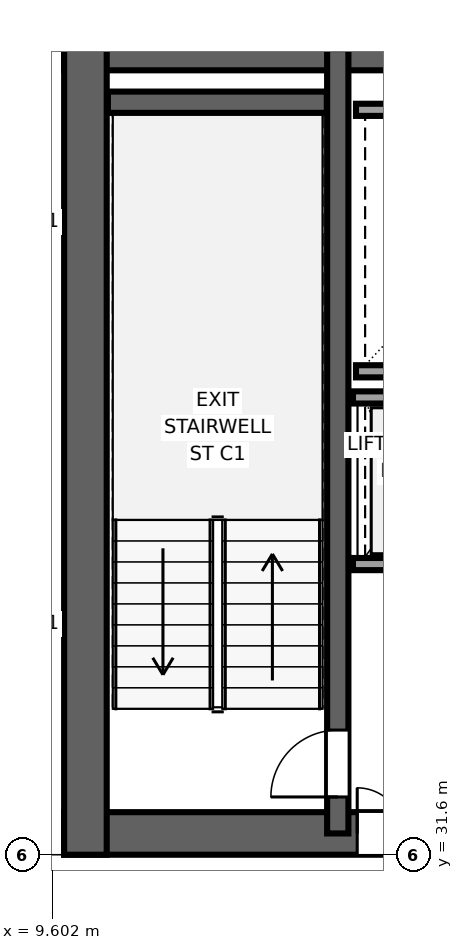
"""IFC4 building model, lengths in metres.
Left out: names, types, materials, properties, quantities, classifications, styles, units other than length and angle.
Written with IfcOpenShell. Run it as: python <this file> out.ifc"""

import sys

from ifc_helpers import new_model, si_unit, direction, frame, frame_2d, origin, place, context, subcontext, project, spatial, rectangle, extrude, source, transform, mapped, element, fill, save


model = new_model("IFC4")
c1 = context("Model", 3, precision=1e-05, world=origin(), true_north=direction((0.0, 1.0)))
c2 = subcontext(c1, "Body", "Model", "MODEL_VIEW")
j1 = project(units=[si_unit("LENGTHUNIT", "METRE"), si_unit("PLANEANGLEUNIT", "RADIAN")], contexts=[c1])
p1 = place(None, origin())
s1 = spatial("IfcSite", under=j1, at=p1, CompositionType="ELEMENT")
p2 = place(p1, origin())
s2 = spatial("IfcBuilding", under=s1, at=p2, CompositionType="ELEMENT")
p3 = place(p2, frame((0.0, 0.0, 122.2)))
s3 = spatial("IfcBuildingStorey", under=s2, at=p3, CompositionType="ELEMENT", Elevation=122.2)
p4 = place(p3, frame((9.8, 31.95, 0.0), z_axis=(0.0, 0.0, 1.0), x_axis=(1.0, 0.0, 0.0)))
e1 = element("IfcWall", 1, at=p4, inside=s3, PredefinedType="SHEAR", context=c2, shape_type="SweptSolid", body=[
    extrude(rectangle(XDim=26.4, YDim=0.7, at=frame_2d((13.2, 0.0))), origin(), (0.0, 0.0, 1.0), 3.55),
])
p5 = place(p4, frame((6.32, 0.0, 0.0), z_axis=(0.0, 0.0, 1.0), x_axis=(-1.0, 0.0, 0.0)))
e2 = element("IfcOpeningElement", 2, at=p5, cuts=e1, PredefinedType="OPENING", context=c2, shape_type="SweptSolid", body=[
    extrude(rectangle(XDim=1.5, YDim=2.04, at=frame_2d((0.75, 1.02))), frame((0.0, 0.36, 0.0), z_axis=(0.0, -1.0, 0.0), x_axis=(1.0, 0.0, 0.0)), (0.0, 0.0, 1.0), 0.72),
])
p6 = place(p4, frame((13.95, 0.0, 0.0), z_axis=(0.0, 0.0, 1.0), x_axis=(-1.0, 0.0, 0.0)))
e3 = element("IfcOpeningElement", 3, at=p6, cuts=e1, PredefinedType="OPENING", context=c2, shape_type="SweptSolid", body=[
    extrude(rectangle(XDim=1.5, YDim=2.04, at=frame_2d((0.75, 1.02))), frame((0.0, 0.36, 0.0), z_axis=(0.0, -1.0, 0.0), x_axis=(1.0, 0.0, 0.0)), (0.0, 0.0, 1.0), 0.72),
])
p7 = place(p4, frame((20.25, 0.0, 0.0), z_axis=(0.0, 0.0, 1.0), x_axis=(-1.0, 0.0, 0.0)))
e4 = element("IfcOpeningElement", 4, at=p7, cuts=e1, PredefinedType="OPENING", context=c2, shape_type="SweptSolid", body=[
    extrude(rectangle(XDim=1.5, YDim=2.04, at=frame_2d((0.75, 1.02))), frame((0.0, 0.36, 0.0), z_axis=(0.0, -1.0, 0.0), x_axis=(1.0, 0.0, 0.0)), (0.0, 0.0, 1.0), 0.72),
])
p8 = place(p4, frame((8.37, 0.0, 0.0), z_axis=(0.0, 0.0, 1.0), x_axis=(-1.0, 0.0, 0.0)))
e5 = element("IfcOpeningElement", 5, at=p8, cuts=e1, PredefinedType="OPENING", context=c2, shape_type="SweptSolid", body=[
    extrude(rectangle(XDim=0.82, YDim=2.01, at=frame_2d((0.41, 1.005))), frame((0.0, 0.36, 0.0), z_axis=(0.0, -1.0, 0.0), x_axis=(1.0, 0.0, 0.0)), (0.0, 0.0, 1.0), 0.72),
])
p9 = place(p3, frame((9.8, 44.85, 0.0), z_axis=(0.0, 0.0, 1.0), x_axis=(1.0, 0.0, 0.0)))
e6 = element("IfcWall", 6, at=p9, inside=s3, PredefinedType="SHEAR", context=c2, shape_type="SweptSolid", body=[
    extrude(rectangle(XDim=26.4, YDim=0.7, at=frame_2d((13.2, 0.0))), origin(), (0.0, 0.0, 1.0), 3.55),
])
p10 = place(p3, frame((10.15, 31.6, 0.0), z_axis=(0.0, 0.0, 1.0), x_axis=(0.0, 1.0, 0.0)))
e7 = element("IfcWall", 7, at=p10, inside=s3, PredefinedType="SHEAR", context=c2, shape_type="SweptSolid", body=[
    extrude(rectangle(XDim=13.6, YDim=0.7, at=frame_2d((6.8, 0.0))), origin(), (0.0, 0.0, 1.0), 3.55),
])
p11 = place(p3, frame((14.3, 31.95, 0.0), z_axis=(0.0, 0.0, 1.0), x_axis=(0.0, 1.0, 0.0)))
e8 = element("IfcWall", 8, at=p11, inside=s3, PredefinedType="SHEAR", context=c2, shape_type="SweptSolid", body=[
    extrude(rectangle(XDim=12.9, YDim=0.35, at=frame_2d((6.45, 0.0))), origin(), (0.0, 0.0, 1.0), 3.55),
])
p12 = place(p11, frame((0.6, 0.0, 0.0)))
e9 = element("IfcOpeningElement", 9, at=p12, cuts=e8, PredefinedType="OPENING", context=c2, shape_type="SweptSolid", body=[
    extrude(rectangle(XDim=1.1, YDim=2.12, at=frame_2d((0.55, 1.06))), frame((0.0, 0.185, 0.0), z_axis=(0.0, -1.0, 0.0), x_axis=(1.0, 0.0, 0.0)), (0.0, 0.0, 1.0), 0.37),
])
p13 = place(p3, frame((10.52, 43.975, 0.0), z_axis=(0.0, 0.0, 1.0), x_axis=(1.0, 0.0, 0.0)))
e10 = element("IfcWall", 10, at=p13, inside=s3, PredefinedType="SHEAR", context=c2, shape_type="SweptSolid", body=[
    extrude(rectangle(XDim=3.6, YDim=0.35, at=frame_2d((1.8, 0.0))), origin(), (0.0, 0.0, 1.0), 3.55),
])
for number, where, z_axis, x_axis in (
    (11, (14.6, 39.55, 0.0), (0.0, 0.0, 1.0), (1.0, 0.0, 0.0)),
    (12, (14.6, 43.85, 0.0), (0.0, 0.0, 1.0), (1.0, 0.0, 0.0)),
):
    element("IfcWall", number, at=place(p3, frame(where, z_axis=z_axis, x_axis=x_axis)), inside=s3, PredefinedType="SOLIDWALL", context=c2, shape_type="SweptSolid", body=[
        extrude(rectangle(XDim=4.1, YDim=0.2, at=frame_2d((2.05, 0.0))), origin(), (0.0, 0.0, 1.0), 3.37),
    ])
p14 = place(p3, frame((14.55, 36.38, 0.0), z_axis=(0.0, 0.0, 1.0), x_axis=(1.0, 0.0, 0.0)))
e13 = element("IfcWall", 13, at=p14, inside=s3, PredefinedType="SOLIDWALL", context=c2, shape_type="SweptSolid", body=[
    extrude(rectangle(XDim=4.075, YDim=0.2, at=frame_2d((2.038, 0.0))), origin(), (0.0, 0.0, 1.0), 3.37),
])
p15 = place(p14, frame((0.55, 0.0, 0.0)))
e14 = element("IfcOpeningElement", 14, at=p15, cuts=e13, PredefinedType="OPENING", context=c2, shape_type="SweptSolid", body=[
    extrude(rectangle(XDim=1.1, YDim=2.12, at=frame_2d((0.55, 1.06))), frame((0.0, 0.11, 0.0), z_axis=(0.0, -1.0, 0.0), x_axis=(1.0, 0.0, 0.0)), (0.0, 0.0, 1.0), 0.22),
])
p16 = place(p14, frame((2.45, 0.0, 0.0)))
e15 = element("IfcOpeningElement", 15, at=p16, cuts=e13, PredefinedType="OPENING", context=c2, shape_type="SweptSolid", body=[
    extrude(rectangle(XDim=1.1, YDim=2.12, at=frame_2d((0.55, 1.06))), frame((0.0, 0.11, 0.0), z_axis=(0.0, -1.0, 0.0), x_axis=(1.0, 0.0, 0.0)), (0.0, 0.0, 1.0), 0.22),
])
p17 = place(p3, frame((14.55, 39.12, 0.0), z_axis=(0.0, 0.0, 1.0), x_axis=(1.0, 0.0, 0.0)))
e16 = element("IfcWall", 16, at=p17, inside=s3, PredefinedType="SOLIDWALL", context=c2, shape_type="SweptSolid", body=[
    extrude(rectangle(XDim=4.075, YDim=0.2, at=frame_2d((2.038, 0.0))), origin(), (0.0, 0.0, 1.0), 3.37),
])
m1 = source(origin(), c2, "Body", "SweptSolid", [
    extrude(rectangle(XDim=1.1, YDim=2.12, at=frame_2d((0.55, 1.06))), frame((0.0, 0.025, 0.0), z_axis=(0.0, -1.0, 0.0), x_axis=(1.0, 0.0, 0.0)), (0.0, 0.0, 1.0), 0.05),
])
p18 = place(p12, origin())
e17 = element("IfcDoor", 17, at=p18, inside=s3, OperationType="SINGLE_SWING_LEFT", PredefinedType="DOOR", context=c2, shape_type="MappedRepresentation", body=[
    mapped(m1, transform((0.0, 0.0, 0.0), x_axis=(1.0, 0.0, 0.0), y_axis=(0.0, 1.0, 0.0), z_axis=(0.0, 0.0, 1.0), scale=1.0)),
])
fill(e9, e17)
m2 = source(origin(), c2, "Body", "SweptSolid", [
    extrude(rectangle(XDim=1.5, YDim=2.04, at=frame_2d((0.75, 1.02))), frame((0.0, 0.025, 0.0), z_axis=(0.0, -1.0, 0.0), x_axis=(1.0, 0.0, 0.0)), (0.0, 0.0, 1.0), 0.05),
])
p19 = place(p5, origin())
e18 = element("IfcDoor", 18, at=p19, inside=s3, OperationType="DOUBLE_DOOR_SINGLE_SWING", PredefinedType="DOOR", context=c2, shape_type="MappedRepresentation", body=[
    mapped(m2, transform((0.0, 0.0, 0.0), x_axis=(1.0, 0.0, 0.0), y_axis=(0.0, 1.0, 0.0), z_axis=(0.0, 0.0, 1.0), scale=1.0)),
])
fill(e2, e18)
save(model, sys.argv[1])
